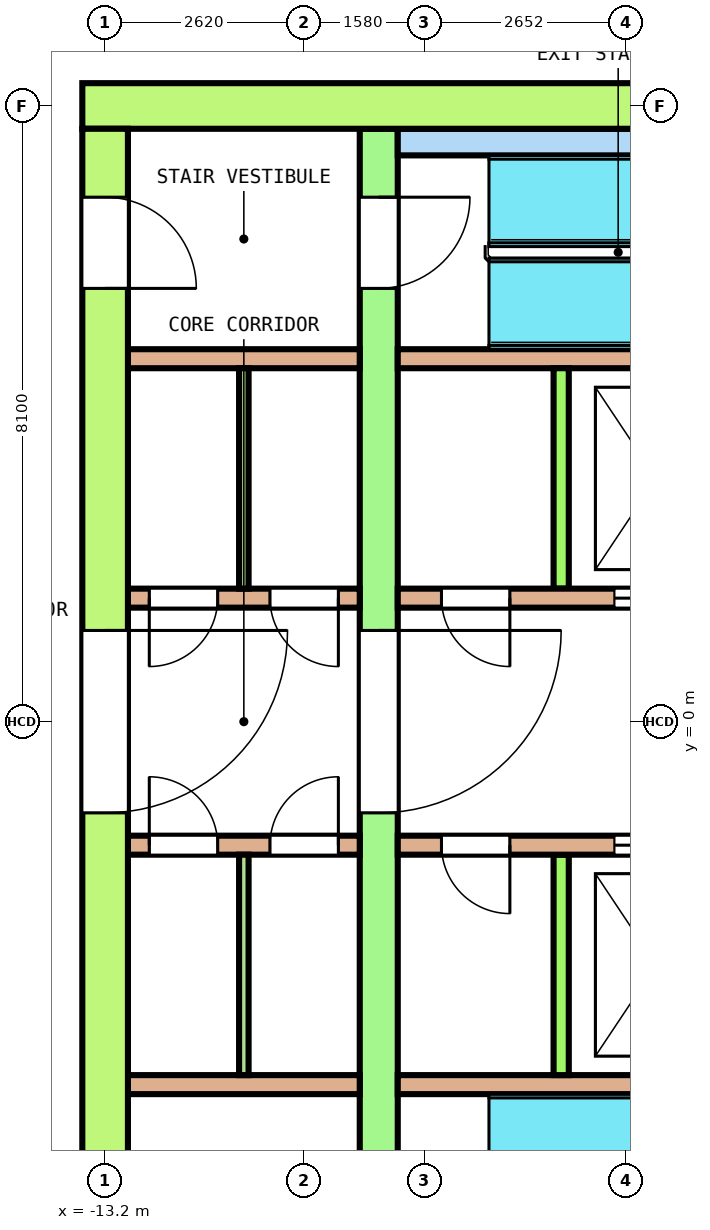
"""IFC4 building model, lengths in metres.
Left out: names, types, materials, properties, quantities, classifications, styles, units other than length and angle.
Written with IfcOpenShell. Run it as: python <this file> out.ifc"""

import sys

from ifc_helpers import new_model, si_unit, direction, frame, frame_2d, origin, place, context, subcontext, project, spatial, polyline, rectangle, outline, extrude, element, fill, save


model = new_model("IFC4")
c1 = context("Model", 3, precision=1e-05, world=origin(), true_north=direction((0.0, 1.0)))
c2 = subcontext(c1, "Body", "Model", "MODEL_VIEW")
j1 = project(units=[si_unit("LENGTHUNIT", "METRE"), si_unit("PLANEANGLEUNIT", "RADIAN")], contexts=[c1])
p1 = place(None, origin())
s1 = spatial("IfcSite", under=j1, at=p1, CompositionType="ELEMENT")
p2 = place(p1, origin())
s2 = spatial("IfcBuilding", under=s1, at=p2, CompositionType="ELEMENT")
p3 = place(p2, frame((0.0, 0.0, 223.4)))
s3 = spatial("IfcBuildingStorey", under=s2, at=p3, CompositionType="ELEMENT", Elevation=223.4)
p4 = place(p3, frame((-23.152, -2.699, 0.0), z_axis=(0.0, 0.0, 1.0), x_axis=(0.499993148765, -0.866029359311, 0.0)))
e1 = element("IfcWall", 1, at=p4, inside=s3, PredefinedType="SOLIDWALL", context=c2, shape_type="SweptSolid", body=[
    extrude(outline(polyline([(-0.027, -0.1), (1.003, -0.1), (2.032, -0.1), (3.062, -0.1), (4.091, -0.1), (5.121, -0.1), (6.15, -0.1), (7.179, -0.1), (8.209, -0.1), (9.238, -0.1), (10.268, -0.1), (11.297, -0.1), (12.327, -0.1), (13.356, -0.1), (14.386, -0.1), (15.415, -0.1), (16.445, -0.1), (17.474, -0.1), (18.504, -0.1), (18.45, 0.1), (17.427, 0.1), (16.403, 0.1), (15.379, 0.1), (14.356, 0.1), (13.333, 0.1), (12.309, 0.1), (11.285, 0.1), (10.262, 0.1), (9.238, 0.1), (8.215, 0.1), (7.191, 0.1), (6.168, 0.1), (5.144, 0.1), (4.121, 0.1), (3.097, 0.1), (2.074, 0.1), (1.05, 0.1), (0.027, 0.1), (-0.027, -0.1)])), origin(), (0.0, 0.0, 1.0), 3.7),
])
p5 = place(p4, frame((0.398, 0.0, 0.1)))
e2 = element("IfcOpeningElement", 2, at=p5, cuts=e1, PredefinedType="OPENING", context=c2, shape_type="SweptSolid", body=[
    extrude(rectangle(XDim=2.9, YDim=2.65, at=frame_2d((1.45, 1.325))), frame((0.0, 0.11, 0.0), z_axis=(0.0, -1.0, 0.0), x_axis=(1.0, 0.0, 0.0)), (0.0, 0.0, 1.0), 0.22),
])
p6 = place(p4, frame((4.093, 0.0, 0.1)))
e3 = element("IfcOpeningElement", 3, at=p6, cuts=e1, PredefinedType="OPENING", context=c2, shape_type="SweptSolid", body=[
    extrude(rectangle(XDim=2.9, YDim=2.65, at=frame_2d((1.45, 1.325))), frame((0.0, 0.11, 0.0), z_axis=(0.0, -1.0, 0.0), x_axis=(1.0, 0.0, 0.0)), (0.0, 0.0, 1.0), 0.22),
])
p7 = place(p4, frame((8.338, 0.0, 0.0)))
e4 = element("IfcOpeningElement", 4, at=p7, cuts=e1, PredefinedType="OPENING", context=c2, shape_type="SweptSolid", body=[
    extrude(rectangle(XDim=1.8, YDim=2.4, at=frame_2d((0.9, 1.2))), frame((0.0, 0.11, 0.0), z_axis=(0.0, -1.0, 0.0), x_axis=(1.0, 0.0, 0.0)), (0.0, 0.0, 1.0), 0.22),
])
p8 = place(p4, frame((8.338, 0.0, 2.55)))
e5 = element("IfcOpeningElement", 5, at=p8, cuts=e1, PredefinedType="OPENING", context=c2, shape_type="SweptSolid", body=[
    extrude(rectangle(XDim=1.8, YDim=0.2, at=frame_2d((0.9, 0.1))), frame((0.0, 0.11, 0.0), z_axis=(0.0, -1.0, 0.0), x_axis=(1.0, 0.0, 0.0)), (0.0, 0.0, 1.0), 0.22),
])
p9 = place(p4, frame((11.484, 0.0, 0.1)))
e6 = element("IfcOpeningElement", 6, at=p9, cuts=e1, PredefinedType="OPENING", context=c2, shape_type="SweptSolid", body=[
    extrude(rectangle(XDim=2.9, YDim=2.65, at=frame_2d((1.45, 1.325))), frame((0.0, 0.11, 0.0), z_axis=(0.0, -1.0, 0.0), x_axis=(1.0, 0.0, 0.0)), (0.0, 0.0, 1.0), 0.22),
])
p10 = place(p4, frame((15.179, 0.0, 0.1)))
e7 = element("IfcOpeningElement", 7, at=p10, cuts=e1, PredefinedType="OPENING", context=c2, shape_type="SweptSolid", body=[
    extrude(rectangle(XDim=2.9, YDim=2.65, at=frame_2d((1.45, 1.325))), frame((0.0, 0.11, 0.0), z_axis=(0.0, -1.0, 0.0), x_axis=(1.0, 0.0, 0.0)), (0.0, 0.0, 1.0), 0.22),
])
p11 = place(p3, frame((-13.5, 8.1, 0.0), z_axis=(0.0, 0.0, 1.0), x_axis=(1.0, 0.0, 0.0)))
e8 = element("IfcWall", 8, at=p11, inside=s3, PredefinedType="SHEAR", context=c2, shape_type="SweptSolid", body=[
    extrude(rectangle(XDim=27.0, YDim=0.6, at=frame_2d((13.5, 0.0))), origin(), (0.0, 0.0, 1.0), 3.7),
])
p12 = place(p11, frame((14.425, 0.0, 0.0)))
e9 = element("IfcOpeningElement", 9, at=p12, cuts=e8, PredefinedType="OPENING", context=c2, shape_type="SweptSolid", body=[
    extrude(rectangle(XDim=1.4, YDim=2.1, at=frame_2d((0.7, 1.05))), frame((0.0, 0.31, 0.0), z_axis=(0.0, -1.0, 0.0), x_axis=(1.0, 0.0, 0.0)), (0.0, 0.0, 1.0), 0.62),
])
p13 = place(p3, frame((-13.2, -7.8, 0.0), z_axis=(0.0, 0.0, 1.0), x_axis=(0.0, 1.0, 0.0)))
e10 = element("IfcWall", 10, at=p13, inside=s3, PredefinedType="SHEAR", context=c2, shape_type="SweptSolid", body=[
    extrude(rectangle(XDim=15.6, YDim=0.6, at=frame_2d((7.8, 0.0))), origin(), (0.0, 0.0, 1.0), 3.7),
])
p14 = place(p13, frame((6.6, 0.0, 0.0)))
e11 = element("IfcOpeningElement", 11, at=p14, cuts=e10, PredefinedType="OPENING", context=c2, shape_type="SweptSolid", body=[
    extrude(rectangle(XDim=2.4, YDim=2.1, at=frame_2d((1.2, 1.05))), frame((0.0, 0.31, 0.0), z_axis=(0.0, -1.0, 0.0), x_axis=(1.0, 0.0, 0.0)), (0.0, 0.0, 1.0), 0.62),
])
p15 = place(p13, frame((13.5, 0.0, 0.0)))
e12 = element("IfcOpeningElement", 12, at=p15, cuts=e10, PredefinedType="OPENING", context=c2, shape_type="SweptSolid", body=[
    extrude(rectangle(XDim=1.2, YDim=2.1, at=frame_2d((0.6, 1.05))), frame((0.0, 0.31, 0.0), z_axis=(0.0, -1.0, 0.0), x_axis=(1.0, 0.0, 0.0)), (0.0, 0.0, 1.0), 0.62),
])
p16 = place(p13, frame((0.9, 0.0, 0.0)))
e13 = element("IfcOpeningElement", 13, at=p16, cuts=e10, PredefinedType="OPENING", context=c2, shape_type="SweptSolid", body=[
    extrude(rectangle(XDim=1.2, YDim=2.1, at=frame_2d((0.6, 1.05))), frame((0.0, 0.31, 0.0), z_axis=(0.0, -1.0, 0.0), x_axis=(1.0, 0.0, 0.0)), (0.0, 0.0, 1.0), 0.62),
])
p17 = place(p3, frame((-9.6, -7.8, 0.0), z_axis=(0.0, 0.0, 1.0), x_axis=(0.0, 1.0, 0.0)))
e14 = element("IfcWall", 14, at=p17, inside=s3, PredefinedType="SHEAR", context=c2, shape_type="SweptSolid", body=[
    extrude(rectangle(XDim=15.6, YDim=0.5, at=frame_2d((7.8, 0.0))), origin(), (0.0, 0.0, 1.0), 3.7),
])
p18 = place(p17, frame((6.6, 0.0, 0.0)))
e15 = element("IfcOpeningElement", 15, at=p18, cuts=e14, PredefinedType="OPENING", context=c2, shape_type="SweptSolid", body=[
    extrude(rectangle(XDim=2.4, YDim=2.1, at=frame_2d((1.2, 1.05))), frame((0.0, 0.26, 0.0), z_axis=(0.0, -1.0, 0.0), x_axis=(1.0, 0.0, 0.0)), (0.0, 0.0, 1.0), 0.52),
])
p19 = place(p17, frame((13.5, 0.0, 0.0)))
e16 = element("IfcOpeningElement", 16, at=p19, cuts=e14, PredefinedType="OPENING", context=c2, shape_type="SweptSolid", body=[
    extrude(rectangle(XDim=1.2, YDim=2.1, at=frame_2d((0.6, 1.05))), frame((0.0, 0.26, 0.0), z_axis=(0.0, -1.0, 0.0), x_axis=(1.0, 0.0, 0.0)), (0.0, 0.0, 1.0), 0.52),
])
p20 = place(p17, frame((0.9, 0.0, 0.0)))
e17 = element("IfcOpeningElement", 17, at=p20, cuts=e14, PredefinedType="OPENING", context=c2, shape_type="SweptSolid", body=[
    extrude(rectangle(XDim=1.2, YDim=2.1, at=frame_2d((0.6, 1.05))), frame((0.0, 0.26, 0.0), z_axis=(0.0, -1.0, 0.0), x_axis=(1.0, 0.0, 0.0)), (0.0, 0.0, 1.0), 0.52),
])
p21 = place(p3, frame((-12.9, 1.625, 0.0), z_axis=(0.0, 0.0, 1.0), x_axis=(1.0, 0.0, 0.0)))
e18 = element("IfcWall", 18, at=p21, inside=s3, PredefinedType="SOLIDWALL", context=c2, shape_type="SweptSolid", body=[
    extrude(rectangle(XDim=3.05, YDim=0.25, at=frame_2d((1.525, 0.0))), origin(), (0.0, 0.0, 1.0), 3.7),
])
p22 = place(p21, frame((0.281, 0.0, 0.0)))
e19 = element("IfcOpeningElement", 19, at=p22, cuts=e18, PredefinedType="OPENING", context=c2, shape_type="SweptSolid", body=[
    extrude(rectangle(XDim=0.9, YDim=2.1, at=frame_2d((0.45, 1.05))), frame((0.0, 0.135, 0.0), z_axis=(0.0, -1.0, 0.0), x_axis=(1.0, 0.0, 0.0)), (0.0, 0.0, 1.0), 0.27),
])
p23 = place(p21, frame((1.869, 0.0, 0.0)))
e20 = element("IfcOpeningElement", 20, at=p23, cuts=e18, PredefinedType="OPENING", context=c2, shape_type="SweptSolid", body=[
    extrude(rectangle(XDim=0.9, YDim=2.1, at=frame_2d((0.45, 1.05))), frame((0.0, 0.135, 0.0), z_axis=(0.0, -1.0, 0.0), x_axis=(1.0, 0.0, 0.0)), (0.0, 0.0, 1.0), 0.27),
])
p24 = place(p3, frame((-9.35, 1.625, 0.0), z_axis=(0.0, 0.0, 1.0), x_axis=(1.0, 0.0, 0.0)))
e21 = element("IfcWall", 21, at=p24, inside=s3, PredefinedType="SOLIDWALL", context=c2, shape_type="SweptSolid", body=[
    extrude(rectangle(XDim=18.7, YDim=0.25, at=frame_2d((9.35, 0.0))), origin(), (0.0, 0.0, 1.0), 3.7),
])
p25 = place(p24, frame((2.85, 0.0, 0.0)))
e22 = element("IfcOpeningElement", 22, at=p25, cuts=e21, PredefinedType="OPENING", context=c2, shape_type="SweptSolid", body=[
    extrude(rectangle(XDim=1.1, YDim=2.1, at=frame_2d((0.55, 1.05))), frame((0.0, 0.135, 0.0), z_axis=(0.0, -1.0, 0.0), x_axis=(1.0, 0.0, 0.0)), (0.0, 0.0, 1.0), 0.27),
])
p26 = place(p24, frame((5.15, 0.0, 0.0)))
e23 = element("IfcOpeningElement", 23, at=p26, cuts=e21, PredefinedType="OPENING", context=c2, shape_type="SweptSolid", body=[
    extrude(rectangle(XDim=1.1, YDim=2.1, at=frame_2d((0.55, 1.05))), frame((0.0, 0.135, 0.0), z_axis=(0.0, -1.0, 0.0), x_axis=(1.0, 0.0, 0.0)), (0.0, 0.0, 1.0), 0.27),
])
p27 = place(p24, frame((14.8, 0.0, 0.0)))
e24 = element("IfcOpeningElement", 24, at=p27, cuts=e21, PredefinedType="OPENING", context=c2, shape_type="SweptSolid", body=[
    extrude(rectangle(XDim=1.1, YDim=2.1, at=frame_2d((0.55, 1.05))), frame((0.0, 0.135, 0.0), z_axis=(0.0, -1.0, 0.0), x_axis=(1.0, 0.0, 0.0)), (0.0, 0.0, 1.0), 0.27),
])
p28 = place(p24, frame((0.575, 0.0, 0.0)))
e25 = element("IfcOpeningElement", 25, at=p28, cuts=e21, PredefinedType="OPENING", context=c2, shape_type="SweptSolid", body=[
    extrude(rectangle(XDim=0.9, YDim=2.1, at=frame_2d((0.45, 1.05))), frame((0.0, 0.135, 0.0), z_axis=(0.0, -1.0, 0.0), x_axis=(1.0, 0.0, 0.0)), (0.0, 0.0, 1.0), 0.27),
])
p29 = place(p24, frame((17.225, 0.0, 0.0)))
e26 = element("IfcOpeningElement", 26, at=p29, cuts=e21, PredefinedType="OPENING", context=c2, shape_type="SweptSolid", body=[
    extrude(rectangle(XDim=0.9, YDim=2.1, at=frame_2d((0.45, 1.05))), frame((0.0, 0.135, 0.0), z_axis=(0.0, -1.0, 0.0), x_axis=(1.0, 0.0, 0.0)), (0.0, 0.0, 1.0), 0.27),
])
p30 = place(p3, frame((-12.9, 4.775, 0.0), z_axis=(0.0, 0.0, 1.0), x_axis=(1.0, 0.0, 0.0)))
e27 = element("IfcWall", 27, at=p30, inside=s3, PredefinedType="SOLIDWALL", context=c2, shape_type="SweptSolid", body=[
    extrude(rectangle(XDim=3.05, YDim=0.25, at=frame_2d((1.525, 0.0))), origin(), (0.0, 0.0, 1.0), 3.7),
])
p31 = place(p3, frame((-9.35, 4.775, 0.0), z_axis=(0.0, 0.0, 1.0), x_axis=(1.0, 0.0, 0.0)))
e28 = element("IfcWall", 28, at=p31, inside=s3, PredefinedType="SOLIDWALL", context=c2, shape_type="SweptSolid", body=[
    extrude(rectangle(XDim=18.7, YDim=0.25, at=frame_2d((9.35, 0.0))), origin(), (0.0, 0.0, 1.0), 3.7),
])
p32 = place(p3, frame((-7.2, 1.75, 0.0), z_axis=(0.0, 0.0, 1.0), x_axis=(0.0, 1.0, 0.0)))
e29 = element("IfcWall", 29, at=p32, inside=s3, PredefinedType="SOLIDWALL", context=c2, shape_type="SweptSolid", body=[
    extrude(rectangle(XDim=2.9, YDim=0.2, at=frame_2d((1.45, 0.0))), origin(), (0.0, 0.0, 1.0), 3.7),
])
p33 = place(p3, frame((-12.9, -1.625, 0.0), z_axis=(0.0, 0.0, 1.0), x_axis=(1.0, 0.0, 0.0)))
e30 = element("IfcWall", 30, at=p33, inside=s3, PredefinedType="SOLIDWALL", context=c2, shape_type="SweptSolid", body=[
    extrude(rectangle(XDim=3.05, YDim=0.25, at=frame_2d((1.525, 0.0))), origin(), (0.0, 0.0, 1.0), 3.7),
])
p34 = place(p33, frame((0.281, 0.0, 0.0)))
e31 = element("IfcOpeningElement", 31, at=p34, cuts=e30, PredefinedType="OPENING", context=c2, shape_type="SweptSolid", body=[
    extrude(rectangle(XDim=0.9, YDim=2.1, at=frame_2d((0.45, 1.05))), frame((0.0, 0.135, 0.0), z_axis=(0.0, -1.0, 0.0), x_axis=(1.0, 0.0, 0.0)), (0.0, 0.0, 1.0), 0.27),
])
p35 = place(p33, frame((1.869, 0.0, 0.0)))
e32 = element("IfcOpeningElement", 32, at=p35, cuts=e30, PredefinedType="OPENING", context=c2, shape_type="SweptSolid", body=[
    extrude(rectangle(XDim=0.9, YDim=2.1, at=frame_2d((0.45, 1.05))), frame((0.0, 0.135, 0.0), z_axis=(0.0, -1.0, 0.0), x_axis=(1.0, 0.0, 0.0)), (0.0, 0.0, 1.0), 0.27),
])
p36 = place(p3, frame((-9.35, -1.625, 0.0), z_axis=(0.0, 0.0, 1.0), x_axis=(1.0, 0.0, 0.0)))
e33 = element("IfcWall", 33, at=p36, inside=s3, PredefinedType="SOLIDWALL", context=c2, shape_type="SweptSolid", body=[
    extrude(rectangle(XDim=18.7, YDim=0.25, at=frame_2d((9.35, 0.0))), origin(), (0.0, 0.0, 1.0), 3.7),
])
p37 = place(p36, frame((2.85, 0.0, 0.0)))
e34 = element("IfcOpeningElement", 34, at=p37, cuts=e33, PredefinedType="OPENING", context=c2, shape_type="SweptSolid", body=[
    extrude(rectangle(XDim=1.1, YDim=2.1, at=frame_2d((0.55, 1.05))), frame((0.0, 0.135, 0.0), z_axis=(0.0, -1.0, 0.0), x_axis=(1.0, 0.0, 0.0)), (0.0, 0.0, 1.0), 0.27),
])
p38 = place(p36, frame((5.15, 0.0, 0.0)))
e35 = element("IfcOpeningElement", 35, at=p38, cuts=e33, PredefinedType="OPENING", context=c2, shape_type="SweptSolid", body=[
    extrude(rectangle(XDim=1.1, YDim=2.1, at=frame_2d((0.55, 1.05))), frame((0.0, 0.135, 0.0), z_axis=(0.0, -1.0, 0.0), x_axis=(1.0, 0.0, 0.0)), (0.0, 0.0, 1.0), 0.27),
])
p39 = place(p36, frame((14.8, 0.0, 0.0)))
e36 = element("IfcOpeningElement", 36, at=p39, cuts=e33, PredefinedType="OPENING", context=c2, shape_type="SweptSolid", body=[
    extrude(rectangle(XDim=1.1, YDim=2.1, at=frame_2d((0.55, 1.05))), frame((0.0, 0.135, 0.0), z_axis=(0.0, -1.0, 0.0), x_axis=(1.0, 0.0, 0.0)), (0.0, 0.0, 1.0), 0.27),
])
p40 = place(p36, frame((0.575, 0.0, 0.0)))
e37 = element("IfcOpeningElement", 37, at=p40, cuts=e33, PredefinedType="OPENING", context=c2, shape_type="SweptSolid", body=[
    extrude(rectangle(XDim=0.9, YDim=2.1, at=frame_2d((0.45, 1.05))), frame((0.0, 0.135, 0.0), z_axis=(0.0, -1.0, 0.0), x_axis=(1.0, 0.0, 0.0)), (0.0, 0.0, 1.0), 0.27),
])
p41 = place(p36, frame((17.225, 0.0, 0.0)))
e38 = element("IfcOpeningElement", 38, at=p41, cuts=e33, PredefinedType="OPENING", context=c2, shape_type="SweptSolid", body=[
    extrude(rectangle(XDim=0.9, YDim=2.1, at=frame_2d((0.45, 1.05))), frame((0.0, 0.135, 0.0), z_axis=(0.0, -1.0, 0.0), x_axis=(1.0, 0.0, 0.0)), (0.0, 0.0, 1.0), 0.27),
])
p42 = place(p3, frame((-12.9, -4.775, 0.0), z_axis=(0.0, 0.0, 1.0), x_axis=(1.0, 0.0, 0.0)))
e39 = element("IfcWall", 39, at=p42, inside=s3, PredefinedType="SOLIDWALL", context=c2, shape_type="SweptSolid", body=[
    extrude(rectangle(XDim=3.05, YDim=0.25, at=frame_2d((1.525, 0.0))), origin(), (0.0, 0.0, 1.0), 3.7),
])
p43 = place(p3, frame((-9.35, -4.775, 0.0), z_axis=(0.0, 0.0, 1.0), x_axis=(1.0, 0.0, 0.0)))
e40 = element("IfcWall", 40, at=p43, inside=s3, PredefinedType="SOLIDWALL", context=c2, shape_type="SweptSolid", body=[
    extrude(rectangle(XDim=18.7, YDim=0.25, at=frame_2d((9.35, 0.0))), origin(), (0.0, 0.0, 1.0), 3.7),
])
p44 = place(p3, frame((-7.2, -4.65, 0.0), z_axis=(0.0, 0.0, 1.0), x_axis=(0.0, 1.0, 0.0)))
e41 = element("IfcWall", 41, at=p44, inside=s3, PredefinedType="SOLIDWALL", context=c2, shape_type="SweptSolid", body=[
    extrude(rectangle(XDim=2.9, YDim=0.2, at=frame_2d((1.45, 0.0))), origin(), (0.0, 0.0, 1.0), 3.7),
])
p45 = place(p3, frame((-9.35, 7.625, 0.0), z_axis=(0.0, 0.0, 1.0), x_axis=(1.0, 0.0, 0.0)))
e42 = element("IfcWall", 42, at=p45, inside=s3, PredefinedType="SOLIDWALL", context=c2, shape_type="SweptSolid", body=[
    extrude(rectangle(XDim=5.8, YDim=0.35, at=frame_2d((2.9, 0.0))), origin(), (0.0, 0.0, 1.0), 3.7),
])
for number, where, z_axis, x_axis in (
    (43, (-11.375, 1.75, 0.0), (0.0, 0.0, 1.0), (0.0, 1.0, 0.0)),
    (44, (-11.375, -4.65, 0.0), (0.0, 0.0, 1.0), (0.0, 1.0, 0.0)),
):
    element("IfcWall", number, at=place(p3, frame(where, z_axis=z_axis, x_axis=x_axis)), inside=s3, PredefinedType="PARTITIONING", context=c2, shape_type="SweptSolid", body=[
        extrude(rectangle(XDim=2.9, YDim=0.125, at=frame_2d((1.45, 0.0))), origin(), (0.0, 0.0, 1.0), 3.7),
    ])
p46 = place(p25, origin())
e45 = element("IfcDoor", 45, at=p46, inside=s3, OperationType="DOUBLE_DOOR_SLIDING", PredefinedType="DOOR", context=c2, shape_type="SweptSolid", body=[
    extrude(rectangle(XDim=1.1, YDim=2.1, at=frame_2d((0.55, 1.05))), frame((0.0, 0.075, 0.0), z_axis=(0.0, -1.0, 0.0), x_axis=(1.0, 0.0, 0.0)), (0.0, 0.0, 1.0), 0.15),
])
fill(e22, e45)
p47 = place(p37, origin())
e46 = element("IfcDoor", 46, at=p47, inside=s3, OperationType="DOUBLE_DOOR_SLIDING", PredefinedType="DOOR", context=c2, shape_type="SweptSolid", body=[
    extrude(rectangle(XDim=1.1, YDim=2.1, at=frame_2d((0.55, 1.05))), frame((0.0, 0.075, 0.0), z_axis=(0.0, -1.0, 0.0), x_axis=(1.0, 0.0, 0.0)), (0.0, 0.0, 1.0), 0.15),
])
fill(e34, e46)
p48 = place(p18, origin())
e47 = element("IfcDoor", 47, at=p48, inside=s3, OperationType="DOUBLE_DOOR_SINGLE_SWING", PredefinedType="DOOR", context=c2, shape_type="SweptSolid", body=[
    extrude(rectangle(XDim=2.4, YDim=2.1, at=frame_2d((1.2, 1.05))), frame((0.0, 0.2, 0.0), z_axis=(0.0, -1.0, 0.0), x_axis=(1.0, 0.0, 0.0)), (0.0, 0.0, 1.0), 0.4),
])
fill(e15, e47)
p49 = place(p14, origin())
e48 = element("IfcDoor", 48, at=p49, inside=s3, OperationType="DOUBLE_DOOR_SINGLE_SWING", PredefinedType="DOOR", context=c2, shape_type="SweptSolid", body=[
    extrude(rectangle(XDim=2.4, YDim=2.1, at=frame_2d((1.2, 1.05))), frame((0.0, 0.25, 0.0), z_axis=(0.0, -1.0, 0.0), x_axis=(1.0, 0.0, 0.0)), (0.0, 0.0, 1.0), 0.5),
])
fill(e11, e48)
p50 = place(p19, origin())
e49 = element("IfcDoor", 49, at=p50, inside=s3, OperationType="SINGLE_SWING_RIGHT", PredefinedType="DOOR", context=c2, shape_type="SweptSolid", body=[
    extrude(rectangle(XDim=1.2, YDim=2.1, at=frame_2d((0.6, 1.05))), frame((0.0, 0.2, 0.0), z_axis=(0.0, -1.0, 0.0), x_axis=(1.0, 0.0, 0.0)), (0.0, 0.0, 1.0), 0.4),
])
fill(e16, e49)
p51 = place(p15, origin())
e50 = element("IfcDoor", 50, at=p51, inside=s3, OperationType="SINGLE_SWING_LEFT", PredefinedType="DOOR", context=c2, shape_type="SweptSolid", body=[
    extrude(rectangle(XDim=1.2, YDim=2.1, at=frame_2d((0.6, 1.05))), frame((0.0, 0.25, 0.0), z_axis=(0.0, -1.0, 0.0), x_axis=(1.0, 0.0, 0.0)), (0.0, 0.0, 1.0), 0.5),
])
fill(e12, e50)
p52 = place(p22, origin())
e51 = element("IfcDoor", 51, at=p52, inside=s3, OperationType="SINGLE_SWING_LEFT", PredefinedType="DOOR", context=c2, shape_type="SweptSolid", body=[
    extrude(rectangle(XDim=0.9, YDim=2.1, at=frame_2d((0.45, 1.05))), frame((0.0, 0.075, 0.0), z_axis=(0.0, -1.0, 0.0), x_axis=(1.0, 0.0, 0.0)), (0.0, 0.0, 1.0), 0.15),
])
fill(e19, e51)
p53 = place(p23, origin())
e52 = element("IfcDoor", 52, at=p53, inside=s3, OperationType="SINGLE_SWING_RIGHT", PredefinedType="DOOR", context=c2, shape_type="SweptSolid", body=[
    extrude(rectangle(XDim=0.9, YDim=2.1, at=frame_2d((0.45, 1.05))), frame((0.0, 0.075, 0.0), z_axis=(0.0, -1.0, 0.0), x_axis=(1.0, 0.0, 0.0)), (0.0, 0.0, 1.0), 0.15),
])
fill(e20, e52)
p54 = place(p28, origin())
e53 = element("IfcDoor", 53, at=p54, inside=s3, OperationType="SINGLE_SWING_LEFT", PredefinedType="DOOR", context=c2, shape_type="SweptSolid", body=[
    extrude(rectangle(XDim=0.9, YDim=2.1, at=frame_2d((0.45, 1.05))), frame((0.0, 0.075, 0.0), z_axis=(0.0, -1.0, 0.0), x_axis=(1.0, 0.0, 0.0)), (0.0, 0.0, 1.0), 0.15),
])
fill(e25, e53)
p55 = place(p34, origin())
e54 = element("IfcDoor", 54, at=p55, inside=s3, OperationType="SINGLE_SWING_RIGHT", PredefinedType="DOOR", context=c2, shape_type="SweptSolid", body=[
    extrude(rectangle(XDim=0.9, YDim=2.1, at=frame_2d((0.45, 1.05))), frame((0.0, 0.075, 0.0), z_axis=(0.0, -1.0, 0.0), x_axis=(1.0, 0.0, 0.0)), (0.0, 0.0, 1.0), 0.15),
])
fill(e31, e54)
p56 = place(p35, origin())
e55 = element("IfcDoor", 55, at=p56, inside=s3, OperationType="SINGLE_SWING_LEFT", PredefinedType="DOOR", context=c2, shape_type="SweptSolid", body=[
    extrude(rectangle(XDim=0.9, YDim=2.1, at=frame_2d((0.45, 1.05))), frame((0.0, 0.075, 0.0), z_axis=(0.0, -1.0, 0.0), x_axis=(1.0, 0.0, 0.0)), (0.0, 0.0, 1.0), 0.15),
])
fill(e32, e55)
p57 = place(p40, origin())
e56 = element("IfcDoor", 56, at=p57, inside=s3, OperationType="SINGLE_SWING_RIGHT", PredefinedType="DOOR", context=c2, shape_type="SweptSolid", body=[
    extrude(rectangle(XDim=0.9, YDim=2.1, at=frame_2d((0.45, 1.05))), frame((0.0, 0.075, 0.0), z_axis=(0.0, -1.0, 0.0), x_axis=(1.0, 0.0, 0.0)), (0.0, 0.0, 1.0), 0.15),
])
fill(e37, e56)
save(model, sys.argv[1])
